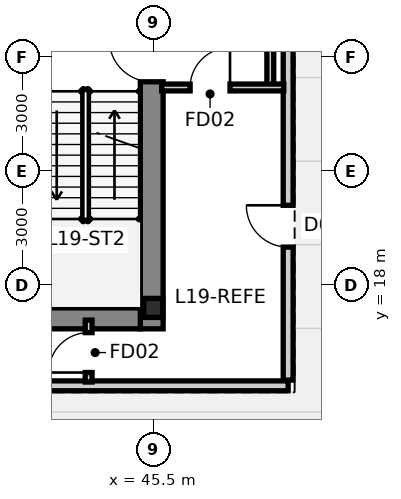
"""IFC4 building model, lengths in metres.
Left out: names, types, materials, properties, quantities, classifications, styles, units other than length and angle.
Written with IfcOpenShell. Run it as: python <this file> out.ifc"""

import sys

from ifc_helpers import new_model, si_unit, direction, frame, frame_2d, origin, origin_2d, place, context, subcontext, project, spatial, rectangle, i_section, extrude, source, transform, mapped, element, fill, save


model = new_model("IFC4")
c1 = context("Model", 3, precision=1e-05, world=origin(), true_north=direction((0.0, 1.0)))
c2 = subcontext(c1, "Body", "Model", "MODEL_VIEW")
j1 = project(units=[si_unit("LENGTHUNIT", "METRE"), si_unit("PLANEANGLEUNIT", "RADIAN")], contexts=[c1])
p1 = place(None, origin())
s1 = spatial("IfcSite", under=j1, at=p1, CompositionType="ELEMENT")
p2 = place(p1, origin())
s2 = spatial("IfcBuilding", under=s1, at=p2, CompositionType="ELEMENT")
p3 = place(p2, frame((0.0, 0.0, 75.05)))
s3 = spatial("IfcBuildingStorey", under=s2, at=p3, CompositionType="ELEMENT", Elevation=75.05)
m1 = source(origin(), c2, "Body", "SweptSolid", [
    extrude(i_section(OverallWidth=0.5, OverallDepth=0.5, WebThickness=0.028, FlangeThickness=0.04, at=origin_2d()), origin(), (0.0, 0.0, 1.0), 4.8),
])
p4 = place(p3, frame((45.5, 17.4, 0.0), z_axis=(0.0, 0.0, 1.0), x_axis=(1.0, 0.0, 0.0)))
e1 = element("IfcColumn", 1, at=p4, inside=s3, PredefinedType="COLUMN", context=c2, shape_type="MappedRepresentation", body=[
    mapped(m1, transform((0.0, 0.0, 0.0), scale=1.0)),
])
p5 = place(p3, frame((45.46, 16.85, 0.0), z_axis=(0.0, 0.0, 1.0), x_axis=(0.0, 1.0, 0.0)))
e2 = element("IfcWall", 2, at=p5, inside=s3, PredefinedType="SHEAR", context=c2, shape_type="SweptSolid", body=[
    extrude(rectangle(XDim=13.425, YDim=0.6, at=frame_2d((6.712, 0.0))), origin(), (0.0, 0.0, 1.0), 4.8),
])
p6 = place(p5, frame((6.5, 0.0, 0.0)))
e3 = element("IfcOpeningElement", 3, at=p6, cuts=e2, PredefinedType="OPENING", context=c2, shape_type="SweptSolid", body=[
    extrude(rectangle(XDim=1.12, YDim=2.15, at=frame_2d((0.56, 1.075))), frame((0.0, 0.312, 0.0), z_axis=(0.0, -1.0, 0.0), x_axis=(1.0, 0.0, 0.0)), (0.0, 0.0, 1.0), 0.624),
])
p7 = place(p5, frame((10.95, 0.0, 0.0)))
e4 = element("IfcOpeningElement", 4, at=p7, cuts=e2, PredefinedType="OPENING", context=c2, shape_type="SweptSolid", body=[
    extrude(rectangle(XDim=1.2, YDim=2.2, at=frame_2d((0.6, 1.1))), frame((0.0, 0.312, 0.0), z_axis=(0.0, -1.0, 0.0), x_axis=(1.0, 0.0, 0.0)), (0.0, 0.0, 1.0), 0.624),
])
p8 = place(p3, frame((42.26, 17.125, 0.0), z_axis=(0.0, 0.0, 1.0), x_axis=(1.0, 0.0, 0.0)))
e5 = element("IfcWall", 5, at=p8, inside=s3, PredefinedType="SHEAR", context=c2, shape_type="SweptSolid", body=[
    extrude(rectangle(XDim=2.9, YDim=0.55, at=frame_2d((1.45, 0.0))), origin(), (0.0, 0.0, 1.0), 4.8),
])
p9 = place(p3, frame((26.95, 15.35, 0.0), z_axis=(0.0, 0.0, 1.0), x_axis=(1.0, 0.0, 0.0)))
e6 = element("IfcWall", 6, at=p9, inside=s3, PredefinedType="STANDARD", context=c2, shape_type="SweptSolid", body=[
    extrude(rectangle(XDim=22.1, YDim=0.26, at=frame_2d((11.05, 0.0))), origin(), (0.0, 0.0, 1.0), 4.176),
])
p10 = place(p3, frame((49.05, 15.5, 0.0), z_axis=(0.0, 0.0, 1.0), x_axis=(0.0, 1.0, 0.0)))
e7 = element("IfcWall", 7, at=p10, inside=s3, PredefinedType="STANDARD", context=c2, shape_type="SweptSolid", body=[
    extrude(rectangle(XDim=17.0, YDim=0.26, at=frame_2d((8.5, 0.0))), origin(), (0.0, 0.0, 1.0), 4.176),
])
p11 = place(p10, frame((3.5, 0.0, 0.0)))
e8 = element("IfcOpeningElement", 8, at=p11, cuts=e7, PredefinedType="OPENING", context=c2, shape_type="SweptSolid", body=[
    extrude(rectangle(XDim=1.1, YDim=2.2, at=frame_2d((0.55, 1.1))), frame((0.0, 0.142, 0.0), z_axis=(0.0, -1.0, 0.0), x_axis=(1.0, 0.0, 0.0)), (0.0, 0.0, 1.0), 0.284),
])
p12 = place(p3, frame((48.58, 23.2, 0.0), z_axis=(0.0, 0.0, 1.0), x_axis=(0.0, 1.0, 0.0)))
e9 = element("IfcWall", 9, at=p12, inside=s3, PredefinedType="PARTITIONING", context=c2, shape_type="SweptSolid", body=[
    extrude(rectangle(XDim=6.4, YDim=0.18, at=frame_2d((3.2, 0.0))), origin(), (0.0, 0.0, 1.0), 4.176),
])
p13 = place(p3, frame((45.72, 23.2, 0.0), z_axis=(0.0, 0.0, 1.0), x_axis=(1.0, 0.0, 0.0)))
e10 = element("IfcWall", 10, at=p13, inside=s3, PredefinedType="PARTITIONING", context=c2, shape_type="SweptSolid", body=[
    extrude(rectangle(XDim=3.215, YDim=0.18, at=frame_2d((1.607, 0.0))), origin(), (0.0, 0.0, 1.0), 4.55),
])
p14 = place(p13, frame((0.75, 0.0, 0.0)))
e11 = element("IfcOpeningElement", 11, at=p14, cuts=e10, PredefinedType="OPENING", context=c2, shape_type="SweptSolid", body=[
    extrude(rectangle(XDim=1.05, YDim=2.15, at=frame_2d((0.525, 1.075))), frame((0.0, 0.102, 0.0), z_axis=(0.0, -1.0, 0.0), x_axis=(1.0, 0.0, 0.0)), (0.0, 0.0, 1.0), 0.204),
])
p15 = place(p3, frame((43.8, 15.45, 0.0), z_axis=(0.0, 0.0, 1.0), x_axis=(0.0, 1.0, 0.0)))
e12 = element("IfcWall", 12, at=p15, inside=s3, PredefinedType="PARTITIONING", context=c2, shape_type="SweptSolid", body=[
    extrude(rectangle(XDim=1.63, YDim=0.18, at=frame_2d((0.815, 0.0))), origin(), (0.0, 0.0, 1.0), 4.55),
])
p16 = place(p15, frame((0.25, 0.0, 0.0)))
e13 = element("IfcOpeningElement", 13, at=p16, cuts=e12, PredefinedType="OPENING", context=c2, shape_type="SweptSolid", body=[
    extrude(rectangle(XDim=1.05, YDim=2.15, at=frame_2d((0.525, 1.075))), frame((0.0, 0.102, 0.0), z_axis=(0.0, -1.0, 0.0), x_axis=(1.0, 0.0, 0.0)), (0.0, 0.0, 1.0), 0.204),
])
p17 = place(p11, origin())
e14 = element("IfcDoor", 14, at=p17, inside=s3, OperationType="SINGLE_SWING_RIGHT", PredefinedType="DOOR", context=c2, shape_type="SweptSolid", body=[
    extrude(rectangle(XDim=1.1, YDim=2.2, at=frame_2d((0.55, 1.1))), frame((0.0, 0.025, 0.0), z_axis=(0.0, -1.0, 0.0), x_axis=(1.0, 0.0, 0.0)), (0.0, 0.0, 1.0), 0.05),
])
fill(e8, e14)
p18 = place(p6, origin())
e15 = element("IfcDoor", 15, at=p18, inside=s3, OperationType="SINGLE_SWING_RIGHT", PredefinedType="DOOR", context=c2, shape_type="SweptSolid", body=[
    extrude(rectangle(XDim=1.12, YDim=2.15, at=frame_2d((0.56, 1.075))), frame((0.0, 0.025, 0.0), z_axis=(0.0, -1.0, 0.0), x_axis=(1.0, 0.0, 0.0)), (0.0, 0.0, 1.0), 0.05),
])
fill(e3, e15)
p19 = place(p14, origin())
e16 = element("IfcDoor", 16, at=p19, inside=s3, OperationType="SINGLE_SWING_RIGHT", PredefinedType="DOOR", context=c2, shape_type="SweptSolid", body=[
    extrude(rectangle(XDim=1.05, YDim=2.15, at=frame_2d((0.525, 1.075))), frame((0.0, 0.025, 0.0), z_axis=(0.0, -1.0, 0.0), x_axis=(1.0, 0.0, 0.0)), (0.0, 0.0, 1.0), 0.05),
])
fill(e11, e16)
p20 = place(p16, origin())
e17 = element("IfcDoor", 17, at=p20, inside=s3, OperationType="SINGLE_SWING_LEFT", PredefinedType="DOOR", context=c2, shape_type="SweptSolid", body=[
    extrude(rectangle(XDim=1.05, YDim=2.15, at=frame_2d((0.525, 1.075))), frame((0.0, 0.025, 0.0), z_axis=(0.0, -1.0, 0.0), x_axis=(1.0, 0.0, 0.0)), (0.0, 0.0, 1.0), 0.05),
])
fill(e13, e17)
save(model, sys.argv[1])
